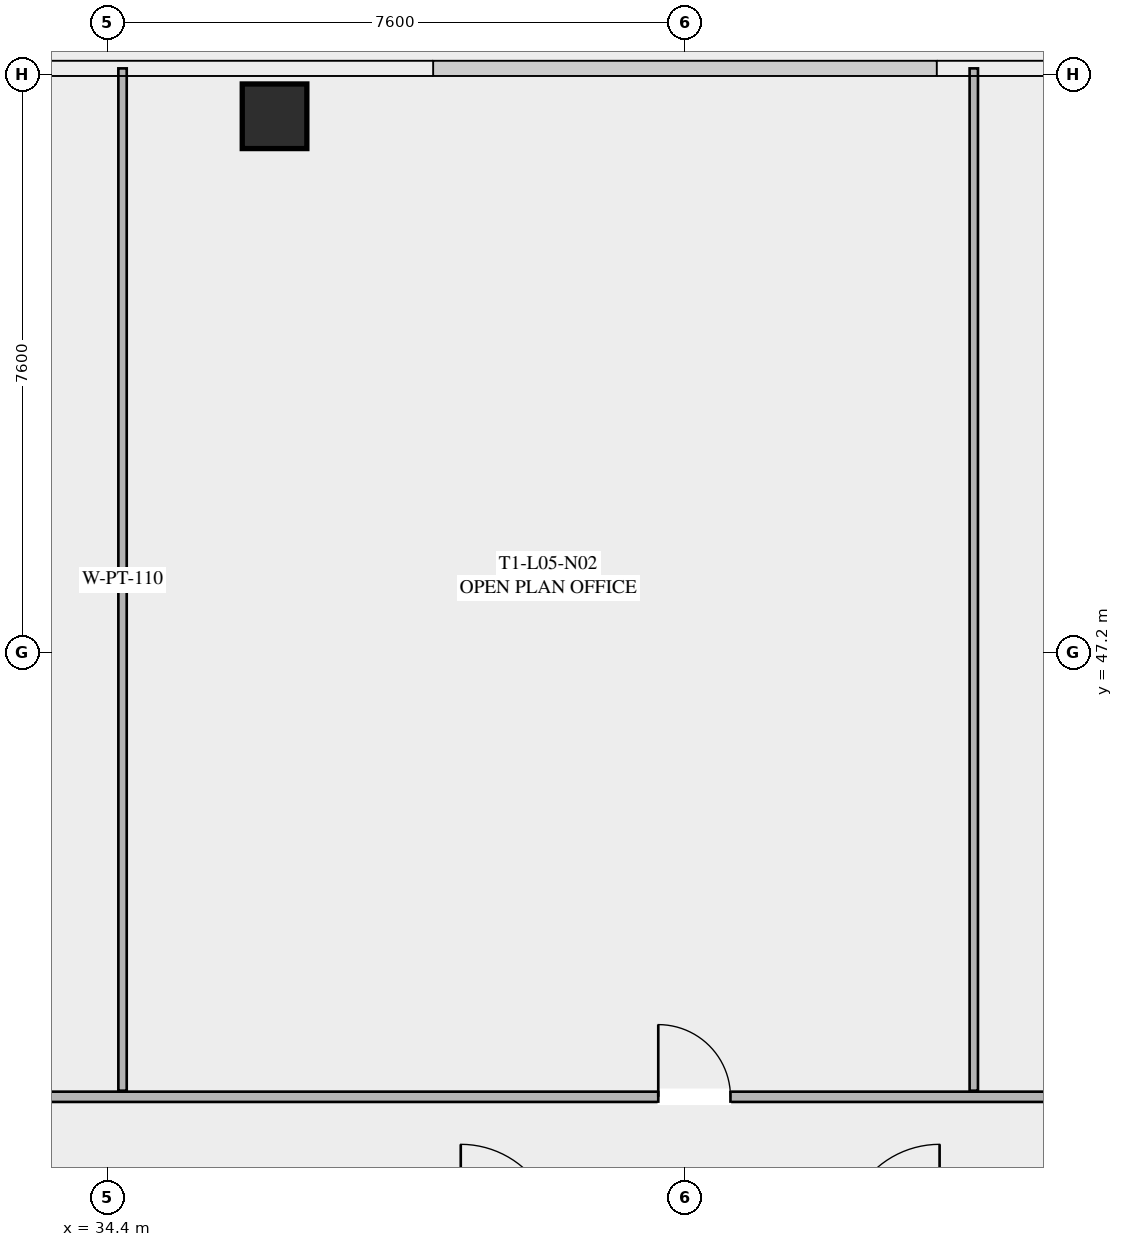
"""IFC4 building model, lengths in metres.
Left out: names, types, materials, properties, quantities, classifications, styles, units other than length and angle.
Written with IfcOpenShell. Run it as: python <this file> out.ifc"""

import sys

from ifc_helpers import new_model, si_unit, direction, frame, frame_2d, origin, origin_2d, place, context, subcontext, project, spatial, rectangle, hollow_rectangle, extrude, element, fill, save


model = new_model("IFC4")
c1 = context("Model", 3, precision=1e-05, world=origin(), true_north=direction((0.0, 1.0)))
c2 = subcontext(c1, "Body", "Model", "MODEL_VIEW")
j1 = project(units=[si_unit("LENGTHUNIT", "METRE"), si_unit("PLANEANGLEUNIT", "RADIAN")], contexts=[c1])
p1 = place(None, origin())
s1 = spatial("IfcSite", under=j1, at=p1, CompositionType="ELEMENT")
p2 = place(p1, origin())
s2 = spatial("IfcBuilding", under=s1, at=p2, CompositionType="ELEMENT")
p3 = place(p2, frame((0.0, 0.0, 24.6)))
s3 = spatial("IfcBuildingStorey", under=s2, at=p3, CompositionType="ELEMENT", Elevation=24.6)
p4 = place(p3, frame((36.6, 54.25, 0.0), z_axis=(0.0, 0.0, 1.0), x_axis=(1.0, 0.0, 0.0)))
e1 = element("IfcColumn", 1, at=p4, inside=s3, PredefinedType="COLUMN", context=c2, shape_type="SweptSolid", body=[
    extrude(hollow_rectangle(XDim=0.85, YDim=0.85, WallThickness=0.035, at=origin_2d()), origin(), (0.0, 0.0, 1.0), 3.35),
])
p5 = place(p3, frame((22.35, 41.35, 0.0), z_axis=(0.0, 0.0, 1.0), x_axis=(1.0, 0.0, 0.0)))
e2 = element("IfcWall", 2, at=p5, inside=s3, PredefinedType="PARTITIONING", context=c2, shape_type="SweptSolid", body=[
    extrude(rectangle(XDim=29.0, YDim=0.135, at=frame_2d((14.5, 0.0))), origin(), (0.0, 0.0, 1.0), 2.703),
])
p6 = place(p5, frame((0.3, 0.0, 0.0)))
e3 = element("IfcOpeningElement", 3, at=p6, cuts=e2, PredefinedType="OPENING", context=c2, shape_type="SweptSolid", body=[
    extrude(rectangle(XDim=0.95, YDim=2.05, at=frame_2d((0.475, 1.025))), frame((0.0, 0.077, 0.0), z_axis=(0.0, -1.0, 0.0), x_axis=(1.0, 0.0, 0.0)), (0.0, 0.0, 1.0), 0.155),
])
p7 = place(p5, frame((19.299, 0.0, 0.0)))
e4 = element("IfcOpeningElement", 4, at=p7, cuts=e2, PredefinedType="OPENING", context=c2, shape_type="SweptSolid", body=[
    extrude(rectangle(XDim=0.95, YDim=2.05, at=frame_2d((0.475, 1.025))), frame((0.0, 0.077, 0.0), z_axis=(0.0, -1.0, 0.0), x_axis=(1.0, 0.0, 0.0)), (0.0, 0.0, 1.0), 0.155),
])
p8 = place(p5, frame((27.75, 0.0, 0.0)))
e5 = element("IfcOpeningElement", 5, at=p8, cuts=e2, PredefinedType="OPENING", context=c2, shape_type="SweptSolid", body=[
    extrude(rectangle(XDim=0.95, YDim=2.05, at=frame_2d((0.475, 1.025))), frame((0.0, 0.077, 0.0), z_axis=(0.0, -1.0, 0.0), x_axis=(1.0, 0.0, 0.0)), (0.0, 0.0, 1.0), 0.155),
])
for number, where, z_axis, x_axis in (
    (6, (34.6, 41.43, 0.0), (0.0, 0.0, 1.0), (0.0, 1.0, 0.0)),
    (7, (45.8, 41.43, 0.0), (0.0, 0.0, 1.0), (0.0, 1.0, 0.0)),
):
    element("IfcWall", number, at=place(p3, frame(where, z_axis=z_axis, x_axis=x_axis)), inside=s3, PredefinedType="PARTITIONING", context=c2, shape_type="SweptSolid", body=[
        extrude(rectangle(XDim=13.45, YDim=0.11, at=frame_2d((6.725, 0.0))), origin(), (0.0, 0.0, 1.0), 2.703),
    ])
p9 = place(p7, origin())
e8 = element("IfcDoor", 8, at=p9, inside=s3, OperationType="SINGLE_SWING_LEFT", PredefinedType="DOOR", context=c2, shape_type="SweptSolid", body=[
    extrude(rectangle(XDim=0.95, YDim=2.05, at=frame_2d((0.475, 1.025))), frame((0.0, 0.025, 0.0), z_axis=(0.0, -1.0, 0.0), x_axis=(1.0, 0.0, 0.0)), (0.0, 0.0, 1.0), 0.05),
])
fill(e4, e8)
save(model, sys.argv[1])
